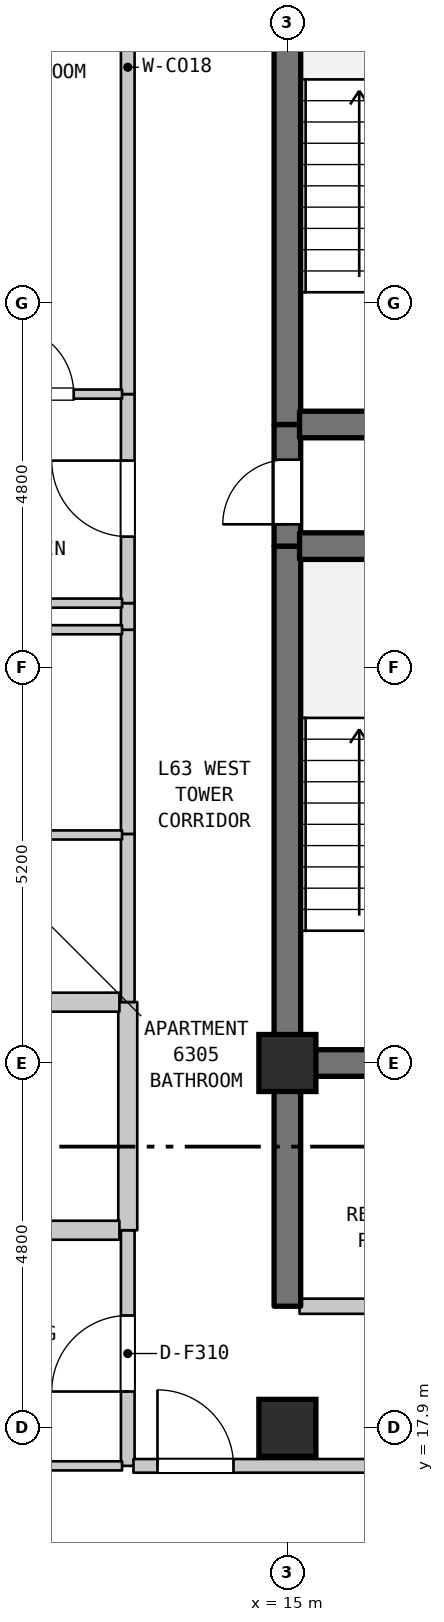
"""IFC4 building model, lengths in metres.
Left out: names, types, materials, properties, quantities, classifications, styles, units other than length and angle.
Written with IfcOpenShell. Run it as: python <this file> out.ifc"""

import sys

from ifc_helpers import new_model, si_unit, direction, frame, frame_2d, origin, origin_2d, place, context, subcontext, project, spatial, rectangle, extrude, element, fill, save


model = new_model("IFC4")
c1 = context("Model", 3, precision=1e-05, world=origin(), true_north=direction((0.0, 1.0)))
c2 = subcontext(c1, "Body", "Model", "MODEL_VIEW")
j1 = project(units=[si_unit("LENGTHUNIT", "METRE"), si_unit("PLANEANGLEUNIT", "RADIAN")], contexts=[c1])
p1 = place(None, origin())
s1 = spatial("IfcSite", under=j1, at=p1, CompositionType="ELEMENT")
p2 = place(p1, origin())
s2 = spatial("IfcBuilding", under=s1, at=p2, CompositionType="ELEMENT")
p3 = place(p2, frame((0.0, 0.0, 254.7)))
s3 = spatial("IfcBuildingStorey", under=s2, at=p3, CompositionType="ELEMENT", Elevation=254.7)
for number, where, z_axis, x_axis in (
    (1, (15.0, 17.9, 0.0), (0.0, 0.0, 1.0), (1.0, 0.0, 0.0)),
    (2, (15.0, 22.7, 0.0), (0.0, 0.0, 1.0), (1.0, 0.0, 0.0)),
):
    element("IfcColumn", number, at=place(p3, frame(where, z_axis=z_axis, x_axis=x_axis)), inside=s3, PredefinedType="COLUMN", context=c2, shape_type="SweptSolid", body=[
        extrude(rectangle(XDim=0.75, YDim=0.75, at=origin_2d()), origin(), (0.0, 0.0, 1.0), 3.7),
    ])
p4 = place(p3, frame((12.9, 17.4, 0.0), z_axis=(0.0, 0.0, 1.0), x_axis=(0.0, 1.0, 0.0)))
e3 = element("IfcWall", 3, at=p4, inside=s3, PredefinedType="STANDARD", context=c2, shape_type="SweptSolid", body=[
    extrude(rectangle(XDim=3.1, YDim=0.18, at=frame_2d((1.55, 0.0))), origin(), (0.0, 0.0, 1.0), 3.39),
])
p5 = place(p4, frame((0.978, 0.0, 0.0)))
e4 = element("IfcOpeningElement", 4, at=p5, cuts=e3, PredefinedType="OPENING", context=c2, shape_type="SweptSolid", body=[
    extrude(rectangle(XDim=1.0, YDim=2.15, at=frame_2d((0.5, 1.075))), frame((0.0, 0.1, 0.0), z_axis=(0.0, -1.0, 0.0), x_axis=(1.0, 0.0, 0.0)), (0.0, 0.0, 1.0), 0.2),
])
p6 = place(p3, frame((12.9, 20.5, 0.0), z_axis=(0.0, 0.0, 1.0), x_axis=(0.0, 1.0, 0.0)))
e5 = element("IfcWall", 5, at=p6, inside=s3, PredefinedType="STANDARD", context=c2, shape_type="SweptSolid", body=[
    extrude(rectangle(XDim=3.002, YDim=0.25, at=frame_2d((1.501, 0.0))), origin(), (0.0, 0.0, 1.0), 3.39),
])
p7 = place(p3, frame((12.9, 23.502, 0.0), z_axis=(0.0, 0.0, 1.0), x_axis=(0.0, 1.0, 0.0)))
e6 = element("IfcWall", 6, at=p7, inside=s3, PredefinedType="STANDARD", context=c2, shape_type="SweptSolid", body=[
    extrude(rectangle(XDim=2.212, YDim=0.18, at=frame_2d((1.106, 0.0))), origin(), (0.0, 0.0, 1.0), 3.39),
])
p8 = place(p3, frame((12.9, 25.714, 0.0), z_axis=(0.0, 0.0, 1.0), x_axis=(0.0, 1.0, 0.0)))
e7 = element("IfcWall", 7, at=p8, inside=s3, PredefinedType="STANDARD", context=c2, shape_type="SweptSolid", body=[
    extrude(rectangle(XDim=2.686, YDim=0.18, at=frame_2d((1.343, 0.0))), origin(), (0.0, 0.0, 1.0), 3.39),
])
p9 = place(p3, frame((12.9, 28.4, 0.0), z_axis=(0.0, 0.0, 1.0), x_axis=(0.0, 1.0, 0.0)))
e8 = element("IfcWall", 8, at=p9, inside=s3, PredefinedType="STANDARD", context=c2, shape_type="SweptSolid", body=[
    extrude(rectangle(XDim=0.35, YDim=0.18, at=frame_2d((0.175, 0.0))), origin(), (0.0, 0.0, 1.0), 3.39),
])
p10 = place(p3, frame((12.9, 28.75, 0.0), z_axis=(0.0, 0.0, 1.0), x_axis=(0.0, 1.0, 0.0)))
e9 = element("IfcWall", 9, at=p10, inside=s3, PredefinedType="STANDARD", context=c2, shape_type="SweptSolid", body=[
    extrude(rectangle(XDim=2.75, YDim=0.18, at=frame_2d((1.375, 0.0))), origin(), (0.0, 0.0, 1.0), 3.39),
])
p11 = place(p10, frame((0.875, 0.0, 0.0)))
e10 = element("IfcOpeningElement", 10, at=p11, cuts=e9, PredefinedType="OPENING", context=c2, shape_type="SweptSolid", body=[
    extrude(rectangle(XDim=1.0, YDim=2.15, at=frame_2d((0.5, 1.075))), frame((0.0, 0.1, 0.0), z_axis=(0.0, -1.0, 0.0), x_axis=(1.0, 0.0, 0.0)), (0.0, 0.0, 1.0), 0.2),
])
p12 = place(p3, frame((12.9, 31.5, 0.0), z_axis=(0.0, 0.0, 1.0), x_axis=(0.0, 1.0, 0.0)))
e11 = element("IfcWall", 11, at=p12, inside=s3, PredefinedType="STANDARD", context=c2, shape_type="SweptSolid", body=[
    extrude(rectangle(XDim=8.6, YDim=0.18, at=frame_2d((4.3, 0.0))), origin(), (0.0, 0.0, 1.0), 3.39),
])
p13 = place(p3, frame((15.0, 19.5, 0.0), z_axis=(0.0, 0.0, 1.0), x_axis=(0.0, 1.0, 0.0)))
e12 = element("IfcWall", 12, at=p13, inside=s3, PredefinedType="SHEAR", context=c2, shape_type="SweptSolid", body=[
    extrude(rectangle(XDim=3.2, YDim=0.35, at=frame_2d((1.6, 0.0))), origin(), (0.0, 0.0, 1.0), 3.39),
])
p14 = place(p3, frame((15.0, 22.7, 0.0), z_axis=(0.0, 0.0, 1.0), x_axis=(0.0, 1.0, 0.0)))
e13 = element("IfcWall", 13, at=p14, inside=s3, PredefinedType="SHEAR", context=c2, shape_type="SweptSolid", body=[
    extrude(rectangle(XDim=6.8, YDim=0.35, at=frame_2d((3.4, 0.0))), origin(), (0.0, 0.0, 1.0), 3.39),
])
p15 = place(p3, frame((15.0, 29.5, 0.0), z_axis=(0.0, 0.0, 1.0), x_axis=(0.0, 1.0, 0.0)))
e14 = element("IfcWall", 14, at=p15, inside=s3, PredefinedType="SHEAR", context=c2, shape_type="SweptSolid", body=[
    extrude(rectangle(XDim=1.6, YDim=0.35, at=frame_2d((0.8, 0.0))), origin(), (0.0, 0.0, 1.0), 3.39),
])
p16 = place(p15, frame((0.287, 0.0, 0.0)))
e15 = element("IfcOpeningElement", 15, at=p16, cuts=e14, PredefinedType="OPENING", context=c2, shape_type="SweptSolid", body=[
    extrude(rectangle(XDim=0.85, YDim=2.1, at=frame_2d((0.425, 1.05))), frame((0.0, 0.185, 0.0), z_axis=(0.0, -1.0, 0.0), x_axis=(1.0, 0.0, 0.0)), (0.0, 0.0, 1.0), 0.37),
])
p17 = place(p3, frame((15.0, 31.1, 0.0), z_axis=(0.0, 0.0, 1.0), x_axis=(0.0, 1.0, 0.0)))
e16 = element("IfcWall", 16, at=p17, inside=s3, PredefinedType="SHEAR", context=c2, shape_type="SweptSolid", body=[
    extrude(rectangle(XDim=6.8, YDim=0.35, at=frame_2d((3.4, 0.0))), origin(), (0.0, 0.0, 1.0), 3.39),
])
p18 = place(p3, frame((8.973, 17.4, 0.0), z_axis=(0.0, 0.0, 1.0), x_axis=(1.0, 0.0, 0.0)))
e17 = element("IfcWall", 17, at=p18, inside=s3, PredefinedType="PARTITIONING", context=c2, shape_type="SweptSolid", body=[
    extrude(rectangle(XDim=3.852, YDim=0.12, at=frame_2d((1.926, 0.0))), origin(), (0.0, 0.0, 1.0), 3.39),
])
p19 = place(p3, frame((12.975, 17.4, 0.0), z_axis=(0.0, 0.0, 1.0), x_axis=(1.0, 0.0, 0.0)))
e18 = element("IfcWall", 18, at=p19, inside=s3, PredefinedType="STANDARD", context=c2, shape_type="SweptSolid", body=[
    extrude(rectangle(XDim=3.49, YDim=0.18, at=frame_2d((1.745, 0.0))), origin(), (0.0, 0.0, 1.0), 3.39),
])
p20 = place(p19, frame((0.316, 0.0, 0.0)))
e19 = element("IfcOpeningElement", 19, at=p20, cuts=e18, PredefinedType="OPENING", context=c2, shape_type="SweptSolid", body=[
    extrude(rectangle(XDim=1.0, YDim=2.15, at=frame_2d((0.5, 1.075))), frame((0.0, 0.1, 0.0), z_axis=(0.0, -1.0, 0.0), x_axis=(1.0, 0.0, 0.0)), (0.0, 0.0, 1.0), 0.2),
])
p21 = place(p3, frame((15.16, 19.5, 0.0), z_axis=(0.0, 0.0, 1.0), x_axis=(1.0, 0.0, 0.0)))
e20 = element("IfcWall", 20, at=p21, inside=s3, PredefinedType="STANDARD", context=c2, shape_type="SweptSolid", body=[
    extrude(rectangle(XDim=3.68, YDim=0.2, at=frame_2d((1.84, 0.0))), origin(), (0.0, 0.0, 1.0), 3.39),
])
p22 = place(p21, frame((1.39, 0.0, 0.0)))
e21 = element("IfcOpeningElement", 21, at=p22, cuts=e20, PredefinedType="OPENING", context=c2, shape_type="SweptSolid", body=[
    extrude(rectangle(XDim=0.9, YDim=2.15, at=frame_2d((0.45, 1.075))), frame((0.0, 0.11, 0.0), z_axis=(0.0, -1.0, 0.0), x_axis=(1.0, 0.0, 0.0)), (0.0, 0.0, 1.0), 0.22),
])
p23 = place(p3, frame((10.76, 20.5, 0.0), z_axis=(0.0, 0.0, 1.0), x_axis=(1.0, 0.0, 0.0)))
e22 = element("IfcWall", 22, at=p23, inside=s3, PredefinedType="STANDARD", context=c2, shape_type="SweptSolid", body=[
    extrude(rectangle(XDim=2.03, YDim=0.25, at=frame_2d((1.015, 0.0))), origin(), (0.0, 0.0, 1.0), 3.39),
])
p24 = place(p3, frame((15.16, 22.7, 0.0), z_axis=(0.0, 0.0, 1.0), x_axis=(1.0, 0.0, 0.0)))
e23 = element("IfcWall", 23, at=p24, inside=s3, PredefinedType="SHEAR", context=c2, shape_type="SweptSolid", body=[
    extrude(rectangle(XDim=3.68, YDim=0.35, at=frame_2d((1.84, 0.0))), origin(), (0.0, 0.0, 1.0), 3.39),
])
p25 = place(p3, frame((10.76, 23.5, 0.0), z_axis=(0.0, 0.0, 1.0), x_axis=(1.0, 0.0, 0.0)))
e24 = element("IfcWall", 24, at=p25, inside=s3, PredefinedType="STANDARD", context=c2, shape_type="SweptSolid", body=[
    extrude(rectangle(XDim=2.03, YDim=0.25, at=frame_2d((1.015, 0.0))), origin(), (0.0, 0.0, 1.0), 3.39),
])
for number, where, z_axis, x_axis in (
    (25, (10.695, 25.7, 0.0), (0.0, 0.0, 1.0), (1.0, 0.0, 0.0)),
    (26, (10.695, 28.4, 0.0), (0.0, 0.0, 1.0), (1.0, 0.0, 0.0)),
):
    element("IfcWall", number, at=place(p3, frame(where, z_axis=z_axis, x_axis=x_axis)), inside=s3, PredefinedType="PARTITIONING", context=c2, shape_type="SweptSolid", body=[
        extrude(rectangle(XDim=2.13, YDim=0.12, at=frame_2d((1.065, 0.0))), origin(), (0.0, 0.0, 1.0), 3.39),
    ])
p26 = place(p3, frame((9.175, 28.75, 0.0), z_axis=(0.0, 0.0, 1.0), x_axis=(1.0, 0.0, 0.0)))
e27 = element("IfcWall", 27, at=p26, inside=s3, PredefinedType="PARTITIONING", context=c2, shape_type="SweptSolid", body=[
    extrude(rectangle(XDim=3.65, YDim=0.12, at=frame_2d((1.825, 0.0))), origin(), (0.0, 0.0, 1.0), 3.39),
])
for number, where, z_axis, x_axis in (
    (28, (15.16, 29.5, 0.0), (0.0, 0.0, 1.0), (1.0, 0.0, 0.0)),
    (29, (15.16, 31.1, 0.0), (0.0, 0.0, 1.0), (1.0, 0.0, 0.0)),
):
    element("IfcWall", number, at=place(p3, frame(where, z_axis=z_axis, x_axis=x_axis)), inside=s3, PredefinedType="SHEAR", context=c2, shape_type="SweptSolid", body=[
        extrude(rectangle(XDim=3.68, YDim=0.35, at=frame_2d((1.84, 0.0))), origin(), (0.0, 0.0, 1.0), 3.39),
    ])
p27 = place(p3, frame((10.623, 31.5, 0.0), z_axis=(0.0, 0.0, 1.0), x_axis=(1.0, 0.0, 0.0)))
e30 = element("IfcWall", 30, at=p27, inside=s3, PredefinedType="PARTITIONING", context=c2, shape_type="SweptSolid", body=[
    extrude(rectangle(XDim=2.202, YDim=0.12, at=frame_2d((1.101, 0.0))), origin(), (0.0, 0.0, 1.0), 3.39),
])
p28 = place(p27, frame((0.666, 0.0, 0.0)))
e31 = element("IfcOpeningElement", 31, at=p28, cuts=e30, PredefinedType="OPENING", context=c2, shape_type="SweptSolid", body=[
    extrude(rectangle(XDim=0.9, YDim=2.1, at=frame_2d((0.45, 1.05))), frame((0.0, 0.07, 0.0), z_axis=(0.0, -1.0, 0.0), x_axis=(1.0, 0.0, 0.0)), (0.0, 0.0, 1.0), 0.14),
])
p29 = place(p5, origin())
e32 = element("IfcDoor", 32, at=p29, inside=s3, OperationType="SINGLE_SWING_LEFT", PredefinedType="DOOR", context=c2, shape_type="SweptSolid", body=[
    extrude(rectangle(XDim=1.0, YDim=2.15, at=frame_2d((0.5, 1.075))), frame((0.0, 0.025, 0.0), z_axis=(0.0, -1.0, 0.0), x_axis=(1.0, 0.0, 0.0)), (0.0, 0.0, 1.0), 0.05),
])
fill(e4, e32)
p30 = place(p11, origin())
e33 = element("IfcDoor", 33, at=p30, inside=s3, OperationType="SINGLE_SWING_RIGHT", PredefinedType="DOOR", context=c2, shape_type="SweptSolid", body=[
    extrude(rectangle(XDim=1.0, YDim=2.15, at=frame_2d((0.5, 1.075))), frame((0.0, 0.025, 0.0), z_axis=(0.0, -1.0, 0.0), x_axis=(1.0, 0.0, 0.0)), (0.0, 0.0, 1.0), 0.05),
])
fill(e10, e33)
p31 = place(p16, origin())
e34 = element("IfcDoor", 34, at=p31, inside=s3, OperationType="SINGLE_SWING_LEFT", PredefinedType="DOOR", context=c2, shape_type="SweptSolid", body=[
    extrude(rectangle(XDim=0.85, YDim=2.1, at=frame_2d((0.425, 1.05))), frame((0.0, 0.025, 0.0), z_axis=(0.0, -1.0, 0.0), x_axis=(1.0, 0.0, 0.0)), (0.0, 0.0, 1.0), 0.05),
])
fill(e15, e34)
p32 = place(p20, origin())
e35 = element("IfcDoor", 35, at=p32, inside=s3, OperationType="SINGLE_SWING_LEFT", PredefinedType="DOOR", context=c2, shape_type="SweptSolid", body=[
    extrude(rectangle(XDim=1.0, YDim=2.15, at=frame_2d((0.5, 1.075))), frame((0.0, 0.025, 0.0), z_axis=(0.0, -1.0, 0.0), x_axis=(1.0, 0.0, 0.0)), (0.0, 0.0, 1.0), 0.05),
])
fill(e19, e35)
p33 = place(p28, origin())
e36 = element("IfcDoor", 36, at=p33, inside=s3, OperationType="SINGLE_SWING_LEFT", PredefinedType="DOOR", context=c2, shape_type="SweptSolid", body=[
    extrude(rectangle(XDim=0.9, YDim=2.1, at=frame_2d((0.45, 1.05))), frame((0.0, 0.025, 0.0), z_axis=(0.0, -1.0, 0.0), x_axis=(1.0, 0.0, 0.0)), (0.0, 0.0, 1.0), 0.05),
])
fill(e31, e36)
save(model, sys.argv[1])
